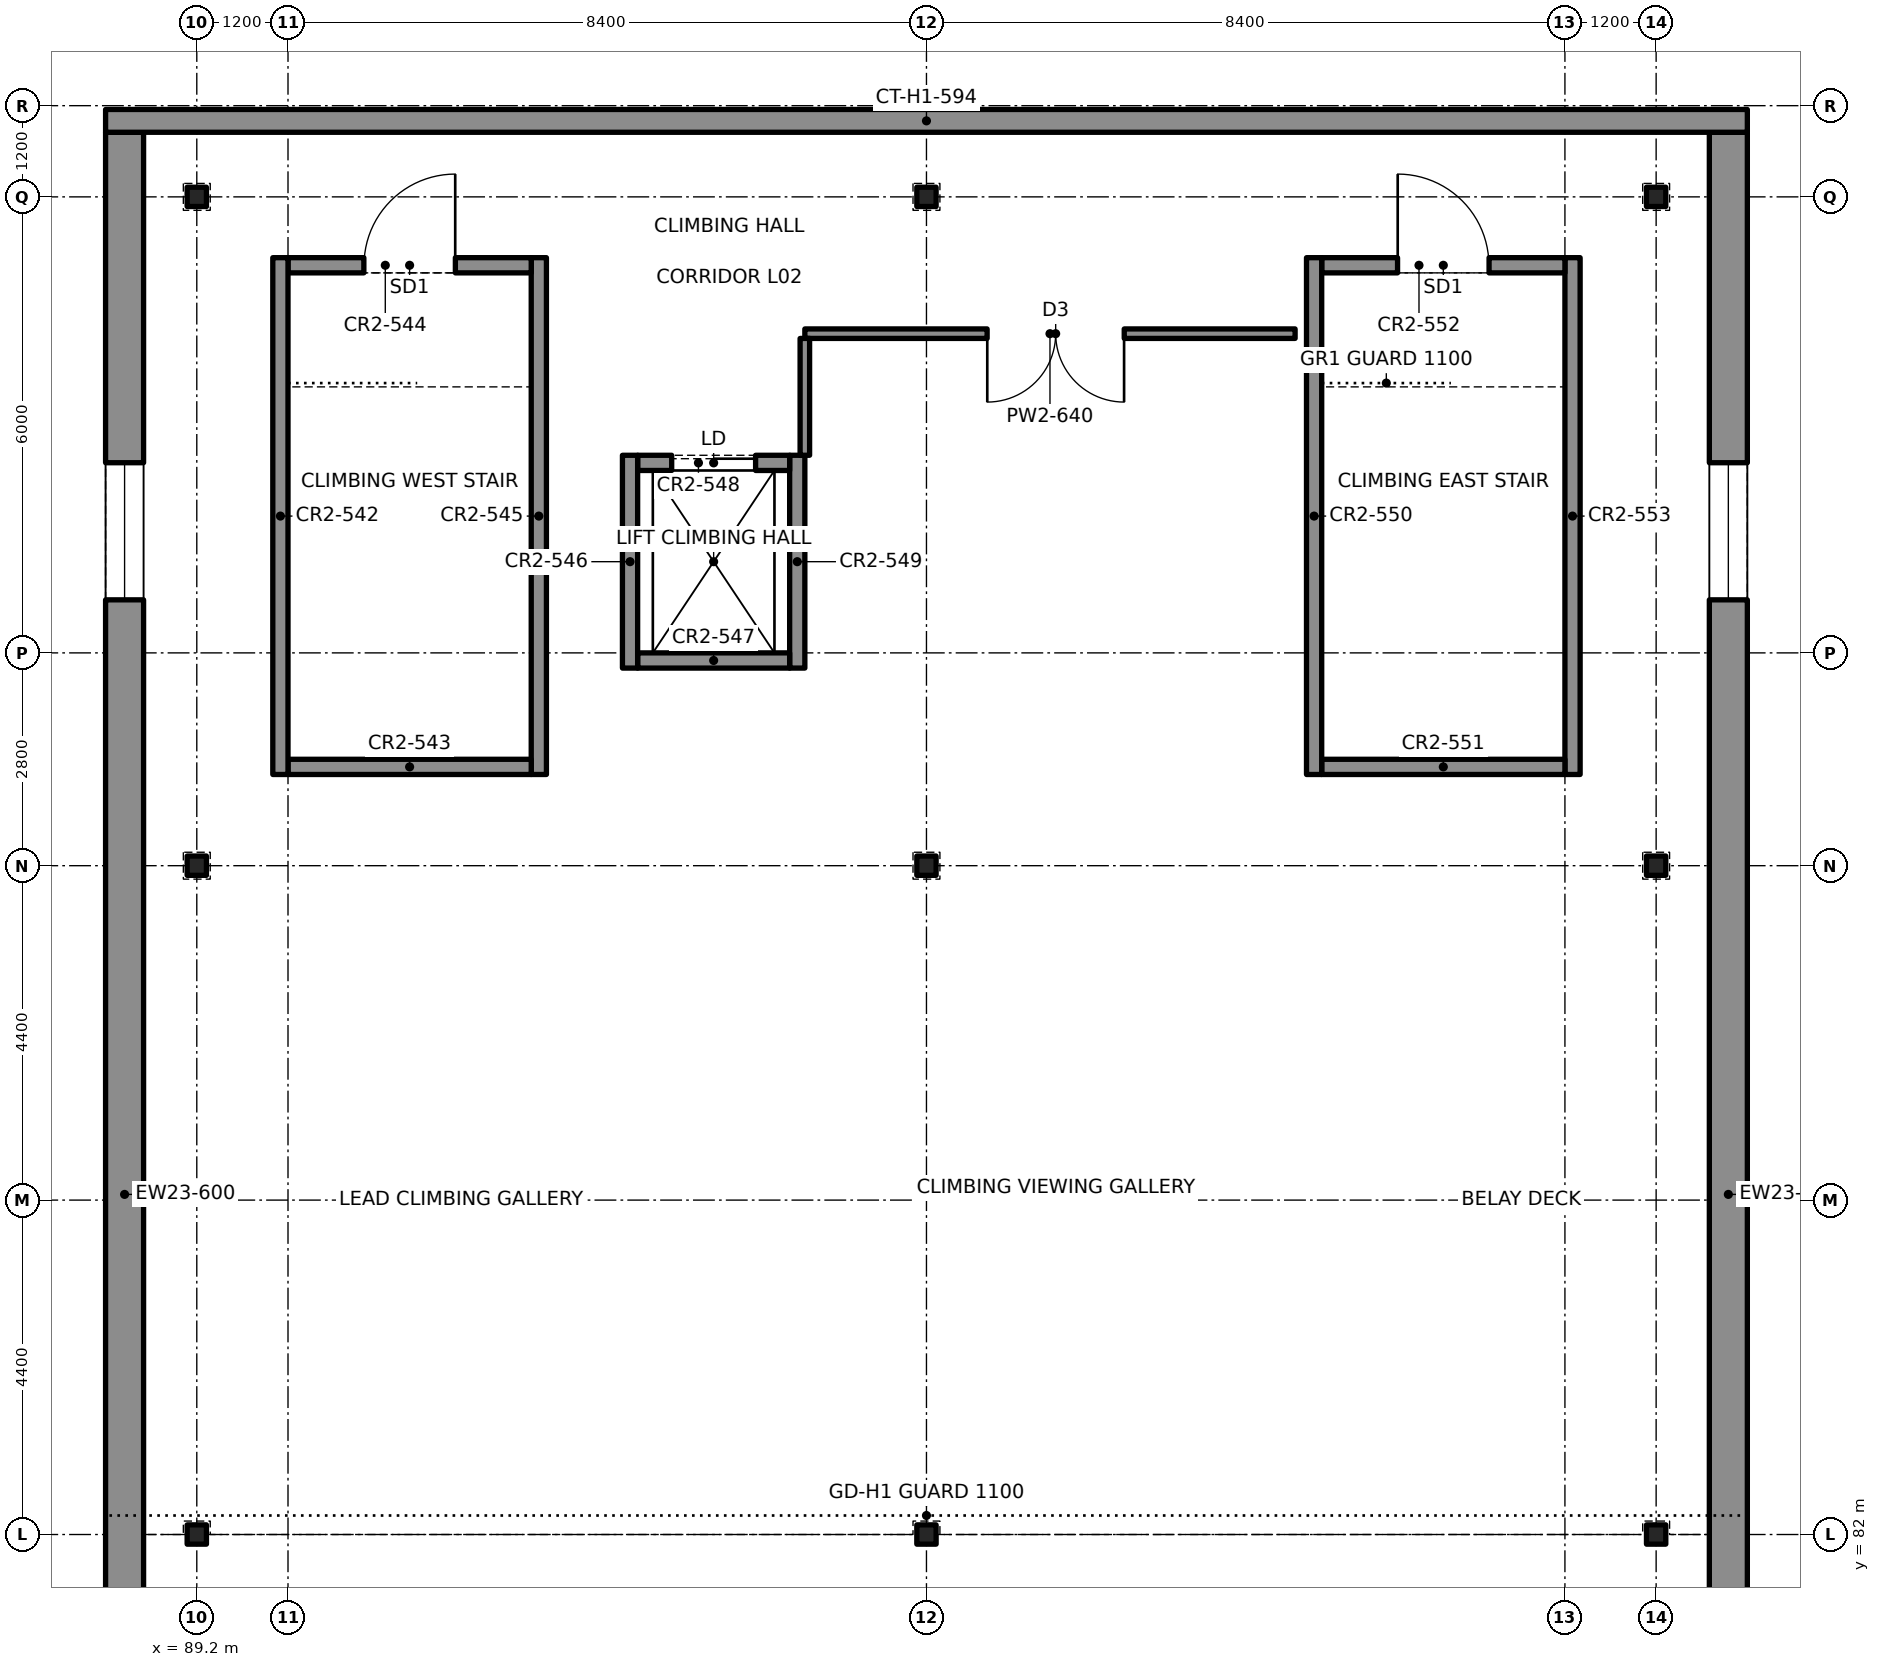
"""IFC4 building model, lengths in metres.
Left out: names, types, materials, properties, quantities, classifications, styles, units other than length and angle.
Written with IfcOpenShell. Run it as: python <this file> out.ifc"""

import sys

from ifc_helpers import new_model, si_unit, direction, frame, frame_2d, origin, origin_2d, place, context, subcontext, project, spatial, rectangle, hollow_rectangle, extrude, element, fill, save


model = new_model("IFC4")
c1 = context("Model", 3, precision=1e-05, world=origin(), true_north=direction((0.0, 1.0)))
c2 = subcontext(c1, "Body", "Model", "MODEL_VIEW")
j1 = project(units=[si_unit("LENGTHUNIT", "METRE"), si_unit("PLANEANGLEUNIT", "RADIAN")], contexts=[c1])
p1 = place(None, origin())
s1 = spatial("IfcSite", under=j1, at=p1, CompositionType="ELEMENT")
p2 = place(p1, origin())
s2 = spatial("IfcBuilding", under=s1, at=p2, CompositionType="ELEMENT")
p3 = place(p2, frame((0.0, 0.0, 8.8)))
s3 = spatial("IfcBuildingStorey", under=s2, at=p3, CompositionType="ELEMENT", Elevation=8.8)
for number, where, z_axis, x_axis in (
    (1, (89.2, 82.0, 0.0), (0.0, 0.0, 1.0), (1.0, 0.0, 0.0)),
    (2, (89.2, 90.8, 0.0), (0.0, 0.0, 1.0), (1.0, 0.0, 0.0)),
    (3, (89.2, 99.6, 0.0), (0.0, 0.0, 1.0), (1.0, 0.0, 0.0)),
    (4, (98.8, 82.0, 0.0), (0.0, 0.0, 1.0), (1.0, 0.0, 0.0)),
    (5, (98.8, 90.8, 0.0), (0.0, 0.0, 1.0), (1.0, 0.0, 0.0)),
    (6, (98.8, 99.6, 0.0), (0.0, 0.0, 1.0), (1.0, 0.0, 0.0)),
    (7, (108.4, 82.0, 0.0), (0.0, 0.0, 1.0), (1.0, 0.0, 0.0)),
    (8, (108.4, 90.8, 0.0), (0.0, 0.0, 1.0), (1.0, 0.0, 0.0)),
    (9, (108.4, 99.6, 0.0), (0.0, 0.0, 1.0), (1.0, 0.0, 0.0)),
):
    element("IfcColumn", number, at=place(p3, frame(where, z_axis=z_axis, x_axis=x_axis)), inside=s3, PredefinedType="COLUMN", context=c2, shape_type="SweptSolid", body=[
        extrude(hollow_rectangle(XDim=0.254, YDim=0.254, WallThickness=0.013, at=origin_2d()), origin(), (0.0, 0.0, 1.0), 5.2),
    ])
p4 = place(p3, frame((88.0, 100.6, 0.0), z_axis=(0.0, 0.0, 1.0), x_axis=(1.0, 0.0, 0.0)))
e10 = element("IfcWall", 10, at=p4, inside=s3, PredefinedType="SOLIDWALL", context=c2, shape_type="SweptSolid", body=[
    extrude(rectangle(XDim=21.6, YDim=0.3, at=frame_2d((10.8, 0.0))), origin(), (0.0, 0.0, 1.0), 5.2),
])
p5 = place(p3, frame((88.25, 72.5, 0.0), z_axis=(0.0, 0.0, 1.0), x_axis=(0.0, 1.0, 0.0)))
e11 = element("IfcWall", 11, at=p5, inside=s3, PredefinedType="SOLIDWALL", context=c2, shape_type="SweptSolid", body=[
    extrude(rectangle(XDim=27.95, YDim=0.5, at=frame_2d((13.975, 0.0))), origin(), (0.0, 0.0, 1.0), 5.2),
])
p6 = place(p5, frame((4.2, 0.0, 0.8)))
e12 = element("IfcOpeningElement", 12, at=p6, cuts=e11, PredefinedType="OPENING", context=c2, shape_type="SweptSolid", body=[
    extrude(rectangle(XDim=1.8, YDim=3.2, at=frame_2d((0.9, 1.6))), frame((0.0, 0.26, 0.0), z_axis=(0.0, -1.0, 0.0), x_axis=(1.0, 0.0, 0.0)), (0.0, 0.0, 1.0), 0.52),
])
p7 = place(p5, frame((21.8, 0.0, 0.8)))
e13 = element("IfcOpeningElement", 13, at=p7, cuts=e11, PredefinedType="OPENING", context=c2, shape_type="SweptSolid", body=[
    extrude(rectangle(XDim=1.8, YDim=3.2, at=frame_2d((0.9, 1.6))), frame((0.0, 0.26, 0.0), z_axis=(0.0, -1.0, 0.0), x_axis=(1.0, 0.0, 0.0)), (0.0, 0.0, 1.0), 0.52),
])
p8 = place(p3, frame((109.35, 72.5, 0.0), z_axis=(0.0, 0.0, 1.0), x_axis=(0.0, 1.0, 0.0)))
e14 = element("IfcWall", 14, at=p8, inside=s3, PredefinedType="SOLIDWALL", context=c2, shape_type="SweptSolid", body=[
    extrude(rectangle(XDim=27.95, YDim=0.5, at=frame_2d((13.975, 0.0))), origin(), (0.0, 0.0, 1.0), 5.2),
])
p9 = place(p8, frame((4.2, 0.0, 0.8)))
e15 = element("IfcOpeningElement", 15, at=p9, cuts=e14, PredefinedType="OPENING", context=c2, shape_type="SweptSolid", body=[
    extrude(rectangle(XDim=1.8, YDim=3.2, at=frame_2d((0.9, 1.6))), frame((0.0, 0.26, 0.0), z_axis=(0.0, -1.0, 0.0), x_axis=(1.0, 0.0, 0.0)), (0.0, 0.0, 1.0), 0.52),
])
p10 = place(p8, frame((21.8, 0.0, 0.8)))
e16 = element("IfcOpeningElement", 16, at=p10, cuts=e14, PredefinedType="OPENING", context=c2, shape_type="SweptSolid", body=[
    extrude(rectangle(XDim=1.8, YDim=3.2, at=frame_2d((0.9, 1.6))), frame((0.0, 0.26, 0.0), z_axis=(0.0, -1.0, 0.0), x_axis=(1.0, 0.0, 0.0)), (0.0, 0.0, 1.0), 0.52),
])
for number, where, z_axis, x_axis in (
    (17, (103.9, 92.0, 0.0), (0.0, 0.0, 1.0), (0.0, 1.0, 0.0)),
    (18, (107.3, 92.0, 0.0), (0.0, 0.0, 1.0), (0.0, 1.0, 0.0)),
):
    element("IfcWall", number, at=place(p3, frame(where, z_axis=z_axis, x_axis=x_axis)), inside=s3, PredefinedType="SOLIDWALL", context=c2, shape_type="SweptSolid", body=[
        extrude(rectangle(XDim=6.8, YDim=0.2, at=frame_2d((3.4, 0.0))), origin(), (0.0, 0.0, 1.0), 3.0),
    ])
p11 = place(p3, frame((104.0, 92.1, 0.0), z_axis=(0.0, 0.0, 1.0), x_axis=(1.0, 0.0, 0.0)))
e19 = element("IfcWall", 19, at=p11, inside=s3, PredefinedType="SOLIDWALL", context=c2, shape_type="SweptSolid", body=[
    extrude(rectangle(XDim=3.2, YDim=0.2, at=frame_2d((1.6, 0.0))), origin(), (0.0, 0.0, 1.0), 3.0),
])
p12 = place(p3, frame((104.0, 98.7, 0.0), z_axis=(0.0, 0.0, 1.0), x_axis=(1.0, 0.0, 0.0)))
e20 = element("IfcWall", 20, at=p12, inside=s3, PredefinedType="SOLIDWALL", context=c2, shape_type="SweptSolid", body=[
    extrude(rectangle(XDim=3.2, YDim=0.2, at=frame_2d((1.6, 0.0))), origin(), (0.0, 0.0, 1.0), 3.0),
])
p13 = place(p12, frame((1.0, 0.0, 0.0)))
e21 = element("IfcOpeningElement", 21, at=p13, cuts=e20, PredefinedType="OPENING", context=c2, shape_type="SweptSolid", body=[
    extrude(rectangle(XDim=1.2, YDim=2.1, at=frame_2d((0.6, 1.05))), frame((0.0, 0.11, 0.0), z_axis=(0.0, -1.0, 0.0), x_axis=(1.0, 0.0, 0.0)), (0.0, 0.0, 1.0), 0.22),
])
for number, where, z_axis, x_axis in (
    (22, (90.3, 92.0, 0.0), (0.0, 0.0, 1.0), (0.0, 1.0, 0.0)),
    (23, (93.7, 92.0, 0.0), (0.0, 0.0, 1.0), (0.0, 1.0, 0.0)),
):
    element("IfcWall", number, at=place(p3, frame(where, z_axis=z_axis, x_axis=x_axis)), inside=s3, PredefinedType="SOLIDWALL", context=c2, shape_type="SweptSolid", body=[
        extrude(rectangle(XDim=6.8, YDim=0.2, at=frame_2d((3.4, 0.0))), origin(), (0.0, 0.0, 1.0), 3.0),
    ])
p14 = place(p3, frame((90.4, 92.1, 0.0), z_axis=(0.0, 0.0, 1.0), x_axis=(1.0, 0.0, 0.0)))
e24 = element("IfcWall", 24, at=p14, inside=s3, PredefinedType="SOLIDWALL", context=c2, shape_type="SweptSolid", body=[
    extrude(rectangle(XDim=3.2, YDim=0.2, at=frame_2d((1.6, 0.0))), origin(), (0.0, 0.0, 1.0), 3.0),
])
p15 = place(p3, frame((90.4, 98.7, 0.0), z_axis=(0.0, 0.0, 1.0), x_axis=(1.0, 0.0, 0.0)))
e25 = element("IfcWall", 25, at=p15, inside=s3, PredefinedType="SOLIDWALL", context=c2, shape_type="SweptSolid", body=[
    extrude(rectangle(XDim=3.2, YDim=0.2, at=frame_2d((1.6, 0.0))), origin(), (0.0, 0.0, 1.0), 3.0),
])
p16 = place(p15, frame((1.0, 0.0, 0.0)))
e26 = element("IfcOpeningElement", 26, at=p16, cuts=e25, PredefinedType="OPENING", context=c2, shape_type="SweptSolid", body=[
    extrude(rectangle(XDim=1.2, YDim=2.1, at=frame_2d((0.6, 1.05))), frame((0.0, 0.11, 0.0), z_axis=(0.0, -1.0, 0.0), x_axis=(1.0, 0.0, 0.0)), (0.0, 0.0, 1.0), 0.22),
])
for number, where, z_axis, x_axis in (
    (27, (94.9, 93.4, 0.0), (0.0, 0.0, 1.0), (0.0, 1.0, 0.0)),
    (28, (97.1, 93.4, 0.0), (0.0, 0.0, 1.0), (0.0, 1.0, 0.0)),
):
    element("IfcWall", number, at=place(p3, frame(where, z_axis=z_axis, x_axis=x_axis)), inside=s3, PredefinedType="SOLIDWALL", context=c2, shape_type="SweptSolid", body=[
        extrude(rectangle(XDim=2.8, YDim=0.2, at=frame_2d((1.4, 0.0))), origin(), (0.0, 0.0, 1.0), 4.0),
    ])
p17 = place(p3, frame((95.0, 93.5, 0.0), z_axis=(0.0, 0.0, 1.0), x_axis=(1.0, 0.0, 0.0)))
e29 = element("IfcWall", 29, at=p17, inside=s3, PredefinedType="SOLIDWALL", context=c2, shape_type="SweptSolid", body=[
    extrude(rectangle(XDim=2.0, YDim=0.2, at=frame_2d((1.0, 0.0))), origin(), (0.0, 0.0, 1.0), 4.0),
])
p18 = place(p3, frame((95.0, 96.1, 0.0), z_axis=(0.0, 0.0, 1.0), x_axis=(1.0, 0.0, 0.0)))
e30 = element("IfcWall", 30, at=p18, inside=s3, PredefinedType="SOLIDWALL", context=c2, shape_type="SweptSolid", body=[
    extrude(rectangle(XDim=2.0, YDim=0.2, at=frame_2d((1.0, 0.0))), origin(), (0.0, 0.0, 1.0), 4.0),
])
p19 = place(p18, frame((0.45, 0.0, 0.0)))
e31 = element("IfcOpeningElement", 31, at=p19, cuts=e30, PredefinedType="OPENING", context=c2, shape_type="SweptSolid", body=[
    extrude(rectangle(XDim=1.1, YDim=2.1, at=frame_2d((0.55, 1.05))), frame((0.0, 0.11, 0.0), z_axis=(0.0, -1.0, 0.0), x_axis=(1.0, 0.0, 0.0)), (0.0, 0.0, 1.0), 0.22),
])
p20 = place(p3, frame((97.2, 97.8, 0.0), z_axis=(0.0, 0.0, 1.0), x_axis=(1.0, 0.0, 0.0)))
e32 = element("IfcWall", 32, at=p20, inside=s3, PredefinedType="PARTITIONING", context=c2, shape_type="SweptSolid", body=[
    extrude(rectangle(XDim=6.45, YDim=0.125, at=frame_2d((3.225, 0.0))), origin(), (0.0, 0.0, 1.0), 4.45),
])
p21 = place(p20, frame((2.4, 0.0, 0.0)))
e33 = element("IfcOpeningElement", 33, at=p21, cuts=e32, PredefinedType="OPENING", context=c2, shape_type="SweptSolid", body=[
    extrude(rectangle(XDim=1.8, YDim=2.1, at=frame_2d((0.9, 1.05))), frame((0.0, 0.073, 0.0), z_axis=(0.0, -1.0, 0.0), x_axis=(1.0, 0.0, 0.0)), (0.0, 0.0, 1.0), 0.145),
])
p22 = place(p3, frame((97.2, 96.2, 0.0), z_axis=(0.0, 0.0, 1.0), x_axis=(0.0, 1.0, 0.0)))
e34 = element("IfcWall", 34, at=p22, inside=s3, PredefinedType="PARTITIONING", context=c2, shape_type="SweptSolid", body=[
    extrude(rectangle(XDim=1.538, YDim=0.125, at=frame_2d((0.769, 0.0))), origin(), (0.0, 0.0, 1.0), 4.45),
])
p23 = place(p7, origin())
e35 = element("IfcWindow", 35, at=p23, inside=s3, PartitioningType="SINGLE_PANEL", PredefinedType="WINDOW", context=c2, shape_type="SweptSolid", body=[
    extrude(rectangle(XDim=1.8, YDim=3.2, at=frame_2d((0.9, 1.6))), frame((0.0, 0.03, 0.0), z_axis=(0.0, -1.0, 0.0), x_axis=(1.0, 0.0, 0.0)), (0.0, 0.0, 1.0), 0.06),
])
fill(e13, e35)
p24 = place(p10, origin())
e36 = element("IfcWindow", 36, at=p24, inside=s3, PartitioningType="SINGLE_PANEL", PredefinedType="WINDOW", context=c2, shape_type="SweptSolid", body=[
    extrude(rectangle(XDim=1.8, YDim=3.2, at=frame_2d((0.9, 1.6))), frame((0.0, 0.03, 0.0), z_axis=(0.0, -1.0, 0.0), x_axis=(1.0, 0.0, 0.0)), (0.0, 0.0, 1.0), 0.06),
])
fill(e16, e36)
p25 = place(p13, origin())
e37 = element("IfcDoor", 37, at=p25, inside=s3, OperationType="SINGLE_SWING_LEFT", PredefinedType="DOOR", context=c2, shape_type="SweptSolid", body=[
    extrude(rectangle(XDim=1.2, YDim=2.1, at=frame_2d((0.6, 1.05))), frame((0.0, 0.025, 0.0), z_axis=(0.0, -1.0, 0.0), x_axis=(1.0, 0.0, 0.0)), (0.0, 0.0, 1.0), 0.05),
])
fill(e21, e37)
p26 = place(p16, origin())
e38 = element("IfcDoor", 38, at=p26, inside=s3, OperationType="SINGLE_SWING_RIGHT", PredefinedType="DOOR", context=c2, shape_type="SweptSolid", body=[
    extrude(rectangle(XDim=1.2, YDim=2.1, at=frame_2d((0.6, 1.05))), frame((0.0, 0.025, 0.0), z_axis=(0.0, -1.0, 0.0), x_axis=(1.0, 0.0, 0.0)), (0.0, 0.0, 1.0), 0.05),
])
fill(e26, e38)
p27 = place(p19, origin())
e39 = element("IfcDoor", 39, at=p27, inside=s3, OperationType="SLIDING_TO_LEFT", PredefinedType="DOOR", context=c2, shape_type="SweptSolid", body=[
    extrude(rectangle(XDim=1.1, YDim=2.1, at=frame_2d((0.55, 1.05))), frame((0.0, 0.025, 0.0), z_axis=(0.0, -1.0, 0.0), x_axis=(1.0, 0.0, 0.0)), (0.0, 0.0, 1.0), 0.05),
])
fill(e31, e39)
p28 = place(p21, origin())
e40 = element("IfcDoor", 40, at=p28, inside=s3, OperationType="DOUBLE_DOOR_SINGLE_SWING", PredefinedType="DOOR", context=c2, shape_type="SweptSolid", body=[
    extrude(rectangle(XDim=1.8, YDim=2.1, at=frame_2d((0.9, 1.05))), frame((0.0, 0.025, 0.0), z_axis=(0.0, -1.0, 0.0), x_axis=(1.0, 0.0, 0.0)), (0.0, 0.0, 1.0), 0.05),
])
fill(e33, e40)
save(model, sys.argv[1])
